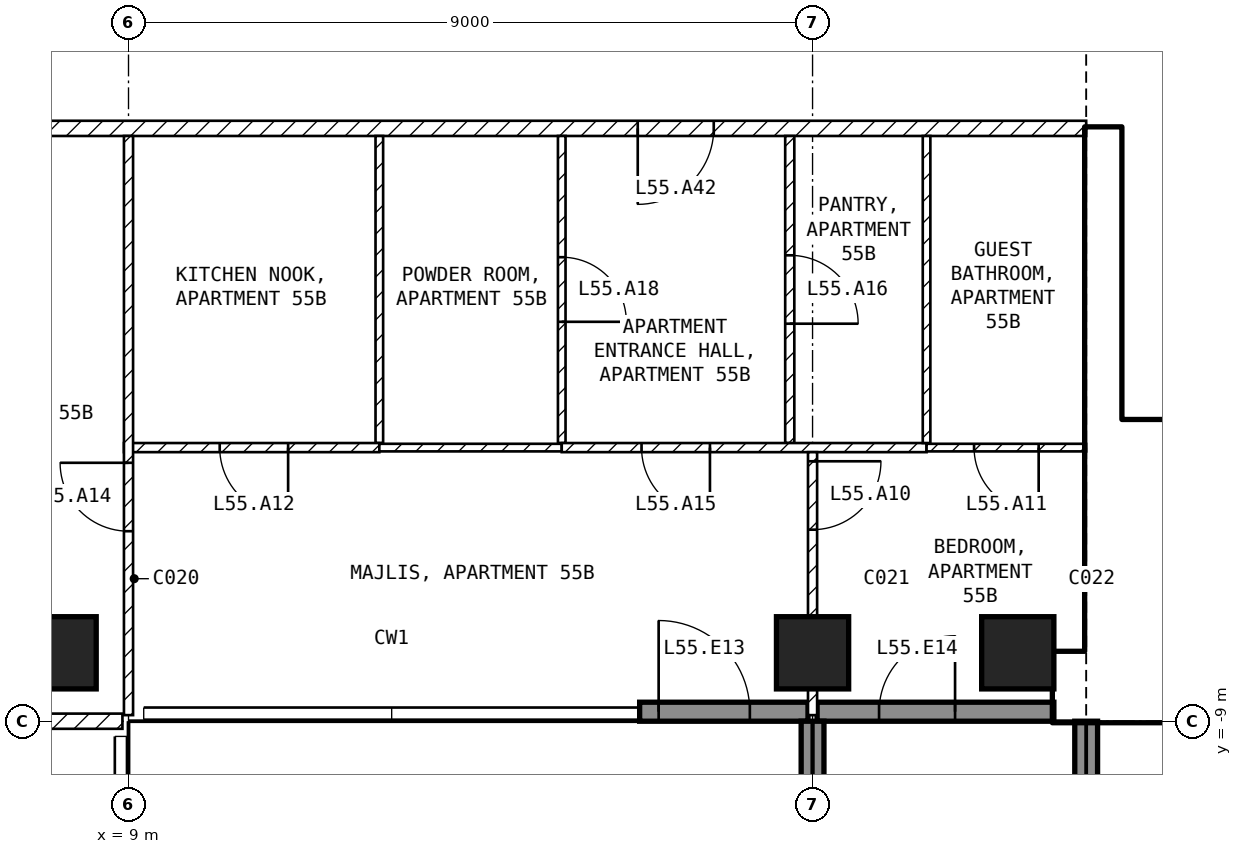
"""IFC4 building model, lengths in metres.
Left out: names, types, materials, properties, quantities, classifications, styles, units other than length and angle.
Written with IfcOpenShell. Run it as: python <this file> out.ifc"""

import sys

from ifc_helpers import new_model, si_unit, direction, frame, frame_2d, origin, origin_2d, place, context, subcontext, project, spatial, rectangle, extrude, element, fill, save


model = new_model("IFC4")
c1 = context("Model", 3, precision=1e-05, world=origin(), true_north=direction((0.0, 1.0)))
c2 = subcontext(c1, "Body", "Model", "MODEL_VIEW")
j1 = project(units=[si_unit("LENGTHUNIT", "METRE"), si_unit("PLANEANGLEUNIT", "RADIAN")], contexts=[c1])
p1 = place(None, origin())
s1 = spatial("IfcSite", under=j1, at=p1, CompositionType="ELEMENT")
p2 = place(p1, origin())
s2 = spatial("IfcBuilding", under=s1, at=p2, CompositionType="ELEMENT")
p3 = place(p2, frame((0.0, 0.0, 219.1)))
s3 = spatial("IfcBuildingStorey", under=s2, at=p3, CompositionType="ELEMENT", Elevation=219.1)
for number, where, z_axis, x_axis in (
    (1, (8.1, -8.1, -0.25), (0.0, 0.0, 1.0), (1.0, 0.0, 0.0)),
    (2, (18.0, -8.1, -0.25), (0.0, 0.0, 1.0), (1.0, 0.0, 0.0)),
    (3, (20.7, -8.1, -0.25), (0.0, 0.0, 1.0), (1.0, 0.0, 0.0)),
):
    element("IfcColumn", number, at=place(p3, frame(where, z_axis=z_axis, x_axis=x_axis)), inside=s3, PredefinedType="COLUMN", context=c2, shape_type="SweptSolid", body=[
        extrude(rectangle(XDim=0.95, YDim=0.95, at=origin_2d()), origin(), (0.0, 0.0, 1.0), 3.45),
    ])
p4 = place(p3, frame((15.725, -8.875, 0.0), z_axis=(0.0, 0.0, 1.0), x_axis=(1.0, 0.0, 0.0)))
e4 = element("IfcWall", 4, at=p4, inside=s3, PredefinedType="SOLIDWALL", context=c2, shape_type="SweptSolid", body=[
    extrude(rectangle(XDim=2.215, YDim=0.25, at=frame_2d((1.107, 0.0))), origin(), (0.0, 0.0, 1.0), 3.2),
])
p5 = place(p4, frame((0.25, 0.0, 0.0)))
e5 = element("IfcOpeningElement", 5, at=p5, cuts=e4, PredefinedType="OPENING", context=c2, shape_type="SweptSolid", body=[
    extrude(rectangle(XDim=1.2, YDim=2.4, at=frame_2d((0.6, 1.2))), frame((0.0, 0.135, 0.0), z_axis=(0.0, -1.0, 0.0), x_axis=(1.0, 0.0, 0.0)), (0.0, 0.0, 1.0), 0.27),
])
p6 = place(p3, frame((18.06, -8.875, 0.0), z_axis=(0.0, 0.0, 1.0), x_axis=(1.0, 0.0, 0.0)))
e6 = element("IfcWall", 6, at=p6, inside=s3, PredefinedType="SOLIDWALL", context=c2, shape_type="SweptSolid", body=[
    extrude(rectangle(XDim=3.115, YDim=0.25, at=frame_2d((1.558, 0.0))), origin(), (0.0, 0.0, 1.0), 3.2),
])
p7 = place(p6, frame((0.815, 0.0, 0.0)))
e7 = element("IfcOpeningElement", 7, at=p7, cuts=e6, PredefinedType="OPENING", context=c2, shape_type="SweptSolid", body=[
    extrude(rectangle(XDim=1.0, YDim=2.4, at=frame_2d((0.5, 1.2))), frame((0.0, 0.135, 0.0), z_axis=(0.0, -1.0, 0.0), x_axis=(1.0, 0.0, 0.0)), (0.0, 0.0, 1.0), 0.27),
])
for number, where, z_axis, x_axis in (
    (8, (18.0, -9.0, 0.0), (0.0, 0.0, 1.0), (0.0, -1.0, 0.0)),
    (9, (21.6, -9.0, 0.0), (0.0, 0.0, 1.0), (0.0, -1.0, 0.0)),
):
    element("IfcWall", number, at=place(p3, frame(where, z_axis=z_axis, x_axis=x_axis)), inside=s3, PredefinedType="SOLIDWALL", context=c2, shape_type="SweptSolid", body=[
        extrude(rectangle(XDim=2.7, YDim=0.3, at=frame_2d((1.35, 0.0))), origin(), (0.0, 0.0, 1.0), 3.2),
    ])
p8 = place(p3, frame((21.175, -8.55, 0.0), z_axis=(0.0, 0.0, 1.0), x_axis=(1.0, 0.0, 0.0)))
e10 = element("IfcWall", 10, at=p8, inside=s3, PredefinedType="SHEAR", context=c2, shape_type="SweptSolid", body=[
    extrude(rectangle(XDim=9.025, YDim=0.9, at=frame_2d((4.512, 0.0))), origin(), (0.0, 0.0, 1.0), 3.2),
])
p9 = place(p3, frame((21.825, -8.1, 0.0), z_axis=(0.0, 0.0, 1.0), x_axis=(0.0, 1.0, 0.0)))
e11 = element("IfcWall", 11, at=p9, inside=s3, PredefinedType="SHEAR", context=c2, shape_type="SweptSolid", body=[
    extrude(rectangle(XDim=6.9, YDim=0.45, at=frame_2d((3.45, 0.0))), origin(), (0.0, 0.0, 1.0), 3.2),
])
p10 = place(p3, frame((22.05, -5.15, 0.0), z_axis=(0.0, 0.0, 1.0), x_axis=(1.0, 0.0, 0.0)))
e12 = element("IfcWall", 12, at=p10, inside=s3, PredefinedType="SOLIDWALL", context=c2, shape_type="SweptSolid", body=[
    extrude(rectangle(XDim=6.3, YDim=0.2, at=frame_2d((3.15, 0.0))), origin(), (0.0, 0.0, 1.0), 3.2),
])
p11 = place(p10, frame((0.2, 0.0, 0.0)))
e13 = element("IfcOpeningElement", 13, at=p11, cuts=e12, PredefinedType="OPENING", context=c2, shape_type="SweptSolid", body=[
    extrude(rectangle(XDim=1.0, YDim=2.1, at=frame_2d((0.5, 1.05))), frame((0.0, 0.11, 0.0), z_axis=(0.0, -1.0, 0.0), x_axis=(1.0, 0.0, 0.0)), (0.0, 0.0, 1.0), 0.22),
])
p12 = place(p3, frame((21.6, -1.2, 0.0), z_axis=(0.0, 0.0, 1.0), x_axis=(-1.0, 0.0, 0.0)))
e14 = element("IfcWall", 14, at=p12, inside=s3, PredefinedType="PARTITIONING", context=c2, shape_type="SweptSolid", body=[
    extrude(rectangle(XDim=17.2, YDim=0.2, at=frame_2d((8.6, 0.0))), origin(), (0.0, 0.0, 1.0), 3.2),
])
p13 = place(p12, frame((4.9, 0.0, 0.0)))
e15 = element("IfcOpeningElement", 15, at=p13, cuts=e14, PredefinedType="OPENING", context=c2, shape_type="SweptSolid", body=[
    extrude(rectangle(XDim=1.0, YDim=2.1, at=frame_2d((0.5, 1.05))), frame((0.0, 0.11, 0.0), z_axis=(0.0, -1.0, 0.0), x_axis=(1.0, 0.0, 0.0)), (0.0, 0.0, 1.0), 0.22),
])
p14 = place(p3, frame((8.92, -9.0, 0.0), z_axis=(0.0, 0.0, 1.0), x_axis=(-1.0, 0.0, 0.0)))
e16 = element("IfcWall", 16, at=p14, inside=s3, PredefinedType="PARTITIONING", context=c2, shape_type="SweptSolid", body=[
    extrude(rectangle(XDim=17.84, YDim=0.2, at=frame_2d((8.92, 0.0))), origin(), (0.0, 0.0, 1.0), 3.2),
])
p15 = place(p14, frame((8.42, 0.0, 0.0)))
e17 = element("IfcOpeningElement", 17, at=p15, cuts=e16, PredefinedType="OPENING", context=c2, shape_type="SweptSolid", body=[
    extrude(rectangle(XDim=1.0, YDim=2.1, at=frame_2d((0.5, 1.05))), frame((0.0, 0.11, 0.0), z_axis=(0.0, -1.0, 0.0), x_axis=(1.0, 0.0, 0.0)), (0.0, 0.0, 1.0), 0.22),
])
p16 = place(p3, frame((12.3, -1.3, 0.0), z_axis=(0.0, 0.0, 1.0), x_axis=(0.0, -1.0, 0.0)))
e18 = element("IfcWall", 18, at=p16, inside=s3, PredefinedType="PARTITIONING", context=c2, shape_type="SweptSolid", body=[
    extrude(rectangle(XDim=4.04, YDim=0.1, at=frame_2d((2.02, 0.0))), origin(), (0.0, 0.0, 1.0), 3.2),
])
p17 = place(p3, frame((12.3, -5.4, 0.0), z_axis=(0.0, 0.0, 1.0), x_axis=(-1.0, 0.0, 0.0)))
e19 = element("IfcWall", 19, at=p17, inside=s3, PredefinedType="PARTITIONING", context=c2, shape_type="SweptSolid", body=[
    extrude(rectangle(XDim=3.36, YDim=0.12, at=frame_2d((1.68, 0.0))), origin(), (0.0, 0.0, 1.0), 3.2),
])
p18 = place(p17, frame((1.2, 0.0, 0.0)))
e20 = element("IfcOpeningElement", 20, at=p18, cuts=e19, PredefinedType="OPENING", context=c2, shape_type="SweptSolid", body=[
    extrude(rectangle(XDim=0.9, YDim=2.1, at=frame_2d((0.45, 1.05))), frame((0.0, 0.07, 0.0), z_axis=(0.0, -1.0, 0.0), x_axis=(1.0, 0.0, 0.0)), (0.0, 0.0, 1.0), 0.14),
])
p19 = place(p3, frame((9.0, -8.92, 0.0), z_axis=(0.0, 0.0, 1.0), x_axis=(0.0, 1.0, 0.0)))
e21 = element("IfcWall", 21, at=p19, inside=s3, PredefinedType="PARTITIONING", context=c2, shape_type="SweptSolid", body=[
    extrude(rectangle(XDim=7.62, YDim=0.12, at=frame_2d((3.81, 0.0))), origin(), (0.0, 0.0, 1.0), 3.2),
])
p20 = place(p19, frame((2.42, 0.0, 0.0)))
e22 = element("IfcOpeningElement", 22, at=p20, cuts=e21, PredefinedType="OPENING", context=c2, shape_type="SweptSolid", body=[
    extrude(rectangle(XDim=0.9, YDim=2.1, at=frame_2d((0.45, 1.05))), frame((0.0, 0.07, 0.0), z_axis=(0.0, -1.0, 0.0), x_axis=(1.0, 0.0, 0.0)), (0.0, 0.0, 1.0), 0.14),
])
p21 = place(p3, frame((14.7, -1.3, 0.0), z_axis=(0.0, 0.0, 1.0), x_axis=(0.0, -1.0, 0.0)))
e23 = element("IfcWall", 23, at=p21, inside=s3, PredefinedType="PARTITIONING", context=c2, shape_type="SweptSolid", body=[
    extrude(rectangle(XDim=4.04, YDim=0.1, at=frame_2d((2.02, 0.0))), origin(), (0.0, 0.0, 1.0), 3.2),
])
p22 = place(p21, frame((1.595, 0.0, 0.0)))
e24 = element("IfcOpeningElement", 24, at=p22, cuts=e23, PredefinedType="OPENING", context=c2, shape_type="SweptSolid", body=[
    extrude(rectangle(XDim=0.85, YDim=2.1, at=frame_2d((0.425, 1.05))), frame((0.0, 0.06, 0.0), z_axis=(0.0, -1.0, 0.0), x_axis=(1.0, 0.0, 0.0)), (0.0, 0.0, 1.0), 0.12),
])
p23 = place(p3, frame((14.7, -5.4, 0.0), z_axis=(0.0, 0.0, 1.0), x_axis=(-1.0, 0.0, 0.0)))
e25 = element("IfcWall", 25, at=p23, inside=s3, PredefinedType="PARTITIONING", context=c2, shape_type="SweptSolid", body=[
    extrude(rectangle(XDim=2.4, YDim=0.1, at=frame_2d((1.2, 0.0))), origin(), (0.0, 0.0, 1.0), 3.2),
])
p24 = place(p3, frame((17.7, -1.3, 0.0), z_axis=(0.0, 0.0, 1.0), x_axis=(0.0, -1.0, 0.0)))
e26 = element("IfcWall", 26, at=p24, inside=s3, PredefinedType="PARTITIONING", context=c2, shape_type="SweptSolid", body=[
    extrude(rectangle(XDim=4.04, YDim=0.12, at=frame_2d((2.02, 0.0))), origin(), (0.0, 0.0, 1.0), 3.2),
])
p25 = place(p24, frame((1.57, 0.0, 0.0)))
e27 = element("IfcOpeningElement", 27, at=p25, cuts=e26, PredefinedType="OPENING", context=c2, shape_type="SweptSolid", body=[
    extrude(rectangle(XDim=0.9, YDim=2.1, at=frame_2d((0.45, 1.05))), frame((0.0, 0.07, 0.0), z_axis=(0.0, -1.0, 0.0), x_axis=(1.0, 0.0, 0.0)), (0.0, 0.0, 1.0), 0.14),
])
p26 = place(p3, frame((19.5, -5.4, 0.0), z_axis=(0.0, 0.0, 1.0), x_axis=(-1.0, 0.0, 0.0)))
e28 = element("IfcWall", 28, at=p26, inside=s3, PredefinedType="PARTITIONING", context=c2, shape_type="SweptSolid", body=[
    extrude(rectangle(XDim=4.8, YDim=0.12, at=frame_2d((2.4, 0.0))), origin(), (0.0, 0.0, 1.0), 3.2),
])
p27 = place(p26, frame((2.85, 0.0, 0.0)))
e29 = element("IfcOpeningElement", 29, at=p27, cuts=e28, PredefinedType="OPENING", context=c2, shape_type="SweptSolid", body=[
    extrude(rectangle(XDim=0.9, YDim=2.1, at=frame_2d((0.45, 1.05))), frame((0.0, 0.07, 0.0), z_axis=(0.0, -1.0, 0.0), x_axis=(1.0, 0.0, 0.0)), (0.0, 0.0, 1.0), 0.14),
])
p28 = place(p3, frame((19.5, -1.3, 0.0), z_axis=(0.0, 0.0, 1.0), x_axis=(0.0, -1.0, 0.0)))
e30 = element("IfcWall", 30, at=p28, inside=s3, PredefinedType="PARTITIONING", context=c2, shape_type="SweptSolid", body=[
    extrude(rectangle(XDim=4.04, YDim=0.1, at=frame_2d((2.02, 0.0))), origin(), (0.0, 0.0, 1.0), 3.2),
])
p29 = place(p3, frame((21.6, -5.4, 0.0), z_axis=(0.0, 0.0, 1.0), x_axis=(-1.0, 0.0, 0.0)))
e31 = element("IfcWall", 31, at=p29, inside=s3, PredefinedType="PARTITIONING", context=c2, shape_type="SweptSolid", body=[
    extrude(rectangle(XDim=2.1, YDim=0.1, at=frame_2d((1.05, 0.0))), origin(), (0.0, 0.0, 1.0), 3.2),
])
p30 = place(p29, frame((0.625, 0.0, 0.0)))
e32 = element("IfcOpeningElement", 32, at=p30, cuts=e31, PredefinedType="OPENING", context=c2, shape_type="SweptSolid", body=[
    extrude(rectangle(XDim=0.85, YDim=2.1, at=frame_2d((0.425, 1.05))), frame((0.0, 0.06, 0.0), z_axis=(0.0, -1.0, 0.0), x_axis=(1.0, 0.0, 0.0)), (0.0, 0.0, 1.0), 0.12),
])
p31 = place(p3, frame((18.0, -5.46, 0.0), z_axis=(0.0, 0.0, 1.0), x_axis=(0.0, -1.0, 0.0)))
e33 = element("IfcWall", 33, at=p31, inside=s3, PredefinedType="PARTITIONING", context=c2, shape_type="SweptSolid", body=[
    extrude(rectangle(XDim=3.46, YDim=0.12, at=frame_2d((1.73, 0.0))), origin(), (0.0, 0.0, 1.0), 2.43),
])
p32 = place(p31, frame((0.12, 0.0, 0.0)))
e34 = element("IfcOpeningElement", 34, at=p32, cuts=e33, PredefinedType="OPENING", context=c2, shape_type="SweptSolid", body=[
    extrude(rectangle(XDim=0.9, YDim=2.1, at=frame_2d((0.45, 1.05))), frame((0.0, 0.07, 0.0), z_axis=(0.0, -1.0, 0.0), x_axis=(1.0, 0.0, 0.0)), (0.0, 0.0, 1.0), 0.14),
])
p33 = place(p5, origin())
e35 = element("IfcDoor", 35, at=p33, inside=s3, OperationType="SINGLE_SWING_LEFT", PredefinedType="DOOR", context=c2, shape_type="SweptSolid", body=[
    extrude(rectangle(XDim=1.2, YDim=2.4, at=frame_2d((0.6, 1.2))), frame((0.0, 0.025, 0.0), z_axis=(0.0, -1.0, 0.0), x_axis=(1.0, 0.0, 0.0)), (0.0, 0.0, 1.0), 0.05),
])
fill(e5, e35)
p34 = place(p7, origin())
e36 = element("IfcDoor", 36, at=p34, inside=s3, OperationType="SINGLE_SWING_RIGHT", PredefinedType="DOOR", context=c2, shape_type="SweptSolid", body=[
    extrude(rectangle(XDim=1.0, YDim=2.4, at=frame_2d((0.5, 1.2))), frame((0.0, 0.025, 0.0), z_axis=(0.0, -1.0, 0.0), x_axis=(1.0, 0.0, 0.0)), (0.0, 0.0, 1.0), 0.05),
])
fill(e7, e36)
p35 = place(p11, origin())
e37 = element("IfcDoor", 37, at=p35, inside=s3, OperationType="SINGLE_SWING_LEFT", PredefinedType="DOOR", context=c2, shape_type="SweptSolid", body=[
    extrude(rectangle(XDim=1.0, YDim=2.1, at=frame_2d((0.5, 1.05))), frame((0.0, 0.025, 0.0), z_axis=(0.0, -1.0, 0.0), x_axis=(1.0, 0.0, 0.0)), (0.0, 0.0, 1.0), 0.05),
])
fill(e13, e37)
p36 = place(p32, origin())
e38 = element("IfcDoor", 38, at=p36, inside=s3, OperationType="SINGLE_SWING_LEFT", PredefinedType="DOOR", context=c2, shape_type="SweptSolid", body=[
    extrude(rectangle(XDim=0.9, YDim=2.1, at=frame_2d((0.45, 1.05))), frame((0.0, 0.025, 0.0), z_axis=(0.0, -1.0, 0.0), x_axis=(1.0, 0.0, 0.0)), (0.0, 0.0, 1.0), 0.05),
])
fill(e34, e38)
p37 = place(p30, origin())
e39 = element("IfcDoor", 39, at=p37, inside=s3, OperationType="SINGLE_SWING_LEFT", PredefinedType="DOOR", context=c2, shape_type="SweptSolid", body=[
    extrude(rectangle(XDim=0.85, YDim=2.1, at=frame_2d((0.425, 1.05))), frame((0.0, 0.025, 0.0), z_axis=(0.0, -1.0, 0.0), x_axis=(1.0, 0.0, 0.0)), (0.0, 0.0, 1.0), 0.05),
])
fill(e32, e39)
p38 = place(p18, origin())
e40 = element("IfcDoor", 40, at=p38, inside=s3, OperationType="SINGLE_SWING_LEFT", PredefinedType="DOOR", context=c2, shape_type="SweptSolid", body=[
    extrude(rectangle(XDim=0.9, YDim=2.1, at=frame_2d((0.45, 1.05))), frame((0.0, 0.025, 0.0), z_axis=(0.0, -1.0, 0.0), x_axis=(1.0, 0.0, 0.0)), (0.0, 0.0, 1.0), 0.05),
])
fill(e20, e40)
p39 = place(p20, origin())
e41 = element("IfcDoor", 41, at=p39, inside=s3, OperationType="SINGLE_SWING_RIGHT", PredefinedType="DOOR", context=c2, shape_type="SweptSolid", body=[
    extrude(rectangle(XDim=0.9, YDim=2.1, at=frame_2d((0.45, 1.05))), frame((0.0, 0.025, 0.0), z_axis=(0.0, -1.0, 0.0), x_axis=(1.0, 0.0, 0.0)), (0.0, 0.0, 1.0), 0.05),
])
fill(e22, e41)
p40 = place(p27, origin())
e42 = element("IfcDoor", 42, at=p40, inside=s3, OperationType="SINGLE_SWING_LEFT", PredefinedType="DOOR", context=c2, shape_type="SweptSolid", body=[
    extrude(rectangle(XDim=0.9, YDim=2.1, at=frame_2d((0.45, 1.05))), frame((0.0, 0.025, 0.0), z_axis=(0.0, -1.0, 0.0), x_axis=(1.0, 0.0, 0.0)), (0.0, 0.0, 1.0), 0.05),
])
fill(e29, e42)
p41 = place(p25, origin())
e43 = element("IfcDoor", 43, at=p41, inside=s3, OperationType="SINGLE_SWING_RIGHT", PredefinedType="DOOR", context=c2, shape_type="SweptSolid", body=[
    extrude(rectangle(XDim=0.9, YDim=2.1, at=frame_2d((0.45, 1.05))), frame((0.0, 0.025, 0.0), z_axis=(0.0, -1.0, 0.0), x_axis=(1.0, 0.0, 0.0)), (0.0, 0.0, 1.0), 0.05),
])
fill(e27, e43)
p42 = place(p22, origin())
e44 = element("IfcDoor", 44, at=p42, inside=s3, OperationType="SINGLE_SWING_RIGHT", PredefinedType="DOOR", context=c2, shape_type="SweptSolid", body=[
    extrude(rectangle(XDim=0.85, YDim=2.1, at=frame_2d((0.425, 1.05))), frame((0.0, 0.025, 0.0), z_axis=(0.0, -1.0, 0.0), x_axis=(1.0, 0.0, 0.0)), (0.0, 0.0, 1.0), 0.05),
])
fill(e24, e44)
p43 = place(p13, origin())
e45 = element("IfcDoor", 45, at=p43, inside=s3, OperationType="SINGLE_SWING_RIGHT", PredefinedType="DOOR", context=c2, shape_type="SweptSolid", body=[
    extrude(rectangle(XDim=1.0, YDim=2.1, at=frame_2d((0.5, 1.05))), frame((0.0, 0.025, 0.0), z_axis=(0.0, -1.0, 0.0), x_axis=(1.0, 0.0, 0.0)), (0.0, 0.0, 1.0), 0.05),
])
fill(e15, e45)
save(model, sys.argv[1])
